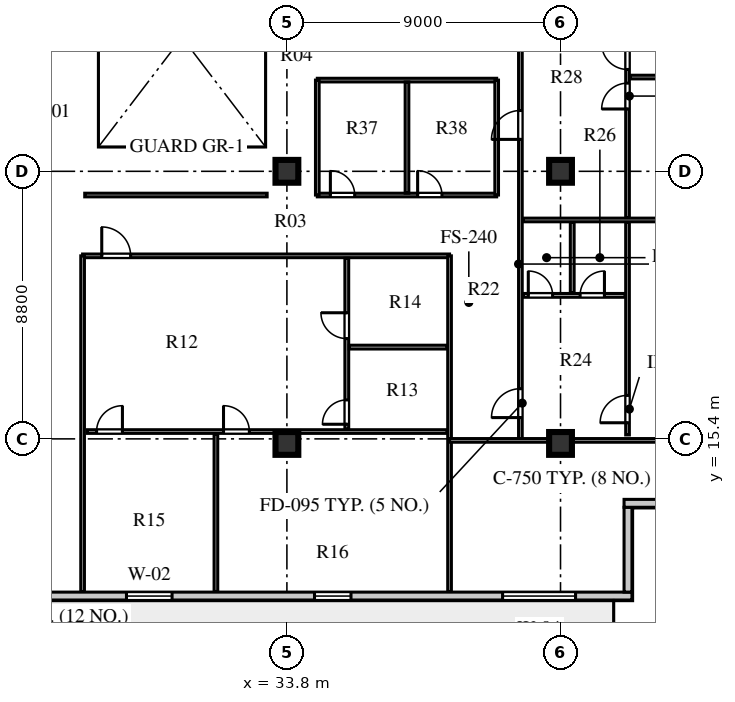
"""IFC4 building model, lengths in metres.
Left out: names, types, materials, properties, quantities, classifications, styles, units other than length and angle.
Written with IfcOpenShell. Run it as: python <this file> out.ifc"""

import sys

from ifc_helpers import new_model, si_unit, direction, frame, frame_2d, origin, origin_2d, place, context, subcontext, project, spatial, rectangle, extrude, element, fill, save


model = new_model("IFC4")
c1 = context("Model", 3, precision=1e-05, world=origin(), true_north=direction((0.0, 1.0)))
c2 = subcontext(c1, "Body", "Model", "MODEL_VIEW")
j1 = project(units=[si_unit("LENGTHUNIT", "METRE"), si_unit("PLANEANGLEUNIT", "RADIAN")], contexts=[c1])
p1 = place(None, origin())
s1 = spatial("IfcSite", under=j1, at=p1, CompositionType="ELEMENT")
p2 = place(p1, origin())
s2 = spatial("IfcBuilding", under=s1, at=p2, CompositionType="ELEMENT")
p3 = place(p2, frame((0.0, 0.0, 288.2)))
s3 = spatial("IfcBuildingStorey", under=s2, at=p3, CompositionType="ELEMENT", Elevation=288.2)
for number, where, z_axis, x_axis in (
    (1, (33.8, 15.25, 0.0), (0.0, 0.0, 1.0), (1.0, 0.0, 0.0)),
    (2, (33.8, 24.2, 0.0), (0.0, 0.0, 1.0), (1.0, 0.0, 0.0)),
    (3, (42.8, 15.25, 0.0), (0.0, 0.0, 1.0), (1.0, 0.0, 0.0)),
    (4, (42.8, 24.2, 0.0), (0.0, 0.0, 1.0), (1.0, 0.0, 0.0)),
):
    element("IfcColumn", number, at=place(p3, frame(where, z_axis=z_axis, x_axis=x_axis)), inside=s3, PredefinedType="COLUMN", context=c2, shape_type="SweptSolid", body=[
        extrude(rectangle(XDim=0.75, YDim=0.75, at=origin_2d()), origin(), (0.0, 0.0, 1.0), 3.66),
    ])
p4 = place(p3, frame((13.45, 10.23, 0.0), z_axis=(0.0, 0.0, 1.0), x_axis=(1.0, 0.0, 0.0)))
e5 = element("IfcWall", 5, at=p4, inside=s3, PredefinedType="SOLIDWALL", context=c2, shape_type="SweptSolid", body=[
    extrude(rectangle(XDim=31.7, YDim=0.26, at=frame_2d((15.85, 0.0))), origin(), (0.0, 0.0, 1.0), 3.66),
])
p5 = place(p4, frame((0.95, 0.0, 0.0)))
e6 = element("IfcOpeningElement", 6, at=p5, cuts=e5, PredefinedType="OPENING", context=c2, shape_type="SweptSolid", body=[
    extrude(rectangle(XDim=1.0, YDim=2.05, at=frame_2d((0.5, 1.025))), frame((0.0, 0.14, 0.0), z_axis=(0.0, -1.0, 0.0), x_axis=(1.0, 0.0, 0.0)), (0.0, 0.0, 1.0), 0.28),
])
p6 = place(p4, frame((2.835, 0.0, 0.8)))
e7 = element("IfcOpeningElement", 7, at=p6, cuts=e5, PredefinedType="OPENING", context=c2, shape_type="SweptSolid", body=[
    extrude(rectangle(XDim=2.25, YDim=2.0, at=frame_2d((1.125, 1.0))), frame((0.0, 0.14, 0.0), z_axis=(0.0, -1.0, 0.0), x_axis=(1.0, 0.0, 0.0)), (0.0, 0.0, 1.0), 0.28),
])
p7 = place(p4, frame((7.995, 0.0, 0.8)))
e8 = element("IfcOpeningElement", 8, at=p7, cuts=e5, PredefinedType="OPENING", context=c2, shape_type="SweptSolid", body=[
    extrude(rectangle(XDim=1.8, YDim=2.0, at=frame_2d((0.9, 1.0))), frame((0.0, 0.14, 0.0), z_axis=(0.0, -1.0, 0.0), x_axis=(1.0, 0.0, 0.0)), (0.0, 0.0, 1.0), 0.28),
])
p8 = place(p4, frame((15.073, 0.0, 0.8)))
e9 = element("IfcOpeningElement", 9, at=p8, cuts=e5, PredefinedType="OPENING", context=c2, shape_type="SweptSolid", body=[
    extrude(rectangle(XDim=1.5, YDim=2.0, at=frame_2d((0.75, 1.0))), frame((0.0, 0.14, 0.0), z_axis=(0.0, -1.0, 0.0), x_axis=(1.0, 0.0, 0.0)), (0.0, 0.0, 1.0), 0.28),
])
p9 = place(p4, frame((21.258, 0.0, 0.8)))
e10 = element("IfcOpeningElement", 10, at=p9, cuts=e5, PredefinedType="OPENING", context=c2, shape_type="SweptSolid", body=[
    extrude(rectangle(XDim=1.2, YDim=1.75, at=frame_2d((0.6, 0.875))), frame((0.0, 0.14, 0.0), z_axis=(0.0, -1.0, 0.0), x_axis=(1.0, 0.0, 0.0)), (0.0, 0.0, 1.0), 0.28),
])
p10 = place(p4, frame((27.445, 0.0, 0.8)))
e11 = element("IfcOpeningElement", 11, at=p10, cuts=e5, PredefinedType="OPENING", context=c2, shape_type="SweptSolid", body=[
    extrude(rectangle(XDim=2.4, YDim=2.05, at=frame_2d((1.2, 1.025))), frame((0.0, 0.14, 0.0), z_axis=(0.0, -1.0, 0.0), x_axis=(1.0, 0.0, 0.0)), (0.0, 0.0, 1.0), 0.28),
])
p11 = place(p3, frame((45.02, 10.36, 0.0), z_axis=(0.0, 0.0, 1.0), x_axis=(0.0, 1.0, 0.0)))
e12 = element("IfcWall", 12, at=p11, inside=s3, PredefinedType="SOLIDWALL", context=c2, shape_type="SweptSolid", body=[
    extrude(rectangle(XDim=2.79, YDim=0.26, at=frame_2d((1.395, 0.0))), origin(), (0.0, 0.0, 1.0), 3.66),
])
p12 = place(p3, frame((44.89, 13.28, 0.0), z_axis=(0.0, 0.0, 1.0), x_axis=(1.0, 0.0, 0.0)))
e13 = element("IfcWall", 13, at=p12, inside=s3, PredefinedType="SOLIDWALL", context=c2, shape_type="SweptSolid", body=[
    extrude(rectangle(XDim=3.31, YDim=0.26, at=frame_2d((1.655, 0.0))), origin(), (0.0, 0.0, 1.0), 3.66),
])
p13 = place(p3, frame((27.08, 21.42, 0.0), z_axis=(0.0, 0.0, 1.0), x_axis=(1.0, 0.0, 0.0)))
e14 = element("IfcWall", 14, at=p13, inside=s3, PredefinedType="PARTITIONING", context=c2, shape_type="SweptSolid", body=[
    extrude(rectangle(XDim=12.07, YDim=0.12, at=frame_2d((6.035, 0.0))), origin(), (0.0, 0.0, 1.0), 3.36),
])
p14 = place(p13, frame((0.63, 0.0, 0.0)))
e15 = element("IfcOpeningElement", 15, at=p14, cuts=e14, PredefinedType="OPENING", context=c2, shape_type="SweptSolid", body=[
    extrude(rectangle(XDim=0.95, YDim=2.1, at=frame_2d((0.475, 1.05))), frame((0.0, 0.07, 0.0), z_axis=(0.0, -1.0, 0.0), x_axis=(1.0, 0.0, 0.0)), (0.0, 0.0, 1.0), 0.14),
])
p15 = place(p3, frame((27.08, 10.38, 0.0), z_axis=(0.0, 0.0, 1.0), x_axis=(0.0, 1.0, 0.0)))
e16 = element("IfcWall", 16, at=p15, inside=s3, PredefinedType="PARTITIONING", context=c2, shape_type="SweptSolid", body=[
    extrude(rectangle(XDim=11.04, YDim=0.12, at=frame_2d((5.52, 0.0))), origin(), (0.0, 0.0, 1.0), 3.66),
])
p16 = place(p3, frame((27.15, 23.42, 0.0), z_axis=(0.0, 0.0, 1.0), x_axis=(1.0, 0.0, 0.0)))
e17 = element("IfcWall", 17, at=p16, inside=s3, PredefinedType="PARTITIONING", context=c2, shape_type="SweptSolid", body=[
    extrude(rectangle(XDim=6.0, YDim=0.12, at=frame_2d((3.0, 0.0))), origin(), (0.0, 0.0, 1.0), 3.66),
])
p17 = place(p3, frame((39.15, 10.38, 0.0), z_axis=(0.0, 0.0, 1.0), x_axis=(0.0, 1.0, 0.0)))
e18 = element("IfcWall", 18, at=p17, inside=s3, PredefinedType="PARTITIONING", context=c2, shape_type="SweptSolid", body=[
    extrude(rectangle(XDim=11.04, YDim=0.12, at=frame_2d((5.52, 0.0))), origin(), (0.0, 0.0, 1.0), 3.66),
])
p18 = place(p3, frame((27.24, 15.641, 0.0), z_axis=(0.0, 0.0, 1.0), x_axis=(1.0, 0.0, 0.0)))
e19 = element("IfcWall", 19, at=p18, inside=s3, PredefinedType="PARTITIONING", context=c2, shape_type="SweptSolid", body=[
    extrude(rectangle(XDim=11.83, YDim=0.12, at=frame_2d((5.915, 0.0))), origin(), (0.0, 0.0, 1.0), 3.66),
])
p19 = place(p18, frame((0.3, 0.0, 0.0)))
e20 = element("IfcOpeningElement", 20, at=p19, cuts=e19, PredefinedType="OPENING", context=c2, shape_type="SweptSolid", body=[
    extrude(rectangle(XDim=0.85, YDim=2.08, at=frame_2d((0.425, 1.04))), frame((0.0, 0.07, 0.0), z_axis=(0.0, -1.0, 0.0), x_axis=(1.0, 0.0, 0.0)), (0.0, 0.0, 1.0), 0.14),
])
p20 = place(p18, frame((4.475, 0.0, 0.0)))
e21 = element("IfcOpeningElement", 21, at=p20, cuts=e19, PredefinedType="OPENING", context=c2, shape_type="SweptSolid", body=[
    extrude(rectangle(XDim=0.85, YDim=2.08, at=frame_2d((0.425, 1.04))), frame((0.0, 0.07, 0.0), z_axis=(0.0, -1.0, 0.0), x_axis=(1.0, 0.0, 0.0)), (0.0, 0.0, 1.0), 0.14),
])
p21 = place(p3, frame((35.77, 15.721, 0.0), z_axis=(0.0, 0.0, 1.0), x_axis=(0.0, 1.0, 0.0)))
e22 = element("IfcWall", 22, at=p21, inside=s3, PredefinedType="PLUMBINGWALL", context=c2, shape_type="SweptSolid", body=[
    extrude(rectangle(XDim=5.619, YDim=0.125, at=frame_2d((2.81, 0.0))), origin(), (0.0, 0.0, 1.0), 3.66),
])
p22 = place(p21, frame((0.16, 0.0, 0.0)))
e23 = element("IfcOpeningElement", 23, at=p22, cuts=e22, PredefinedType="OPENING", context=c2, shape_type="SweptSolid", body=[
    extrude(rectangle(XDim=0.8, YDim=2.05, at=frame_2d((0.4, 1.025))), frame((0.0, 0.073, 0.0), z_axis=(0.0, -1.0, 0.0), x_axis=(1.0, 0.0, 0.0)), (0.0, 0.0, 1.0), 0.145),
])
p23 = place(p21, frame((2.977, 0.0, 0.0)))
e24 = element("IfcOpeningElement", 24, at=p23, cuts=e22, PredefinedType="OPENING", context=c2, shape_type="SweptSolid", body=[
    extrude(rectangle(XDim=0.85, YDim=2.08, at=frame_2d((0.425, 1.04))), frame((0.0, 0.073, 0.0), z_axis=(0.0, -1.0, 0.0), x_axis=(1.0, 0.0, 0.0)), (0.0, 0.0, 1.0), 0.145),
])
p24 = place(p3, frame((35.85, 18.418, 0.0), z_axis=(0.0, 0.0, 1.0), x_axis=(1.0, 0.0, 0.0)))
e25 = element("IfcWall", 25, at=p24, inside=s3, PredefinedType="PLUMBINGWALL", context=c2, shape_type="SweptSolid", body=[
    extrude(rectangle(XDim=3.22, YDim=0.125, at=frame_2d((1.61, 0.0))), origin(), (0.0, 0.0, 1.0), 3.36),
])
p25 = place(p3, frame((31.465, 10.38, 0.0), z_axis=(0.0, 0.0, 1.0), x_axis=(0.0, 1.0, 0.0)))
e26 = element("IfcWall", 26, at=p25, inside=s3, PredefinedType="PARTITIONING", context=c2, shape_type="SweptSolid", body=[
    extrude(rectangle(XDim=5.181, YDim=0.12, at=frame_2d((2.591, 0.0))), origin(), (0.0, 0.0, 1.0), 3.66),
])
p26 = place(p3, frame((41.48, 15.35, 0.0), z_axis=(0.0, 0.0, 1.0), x_axis=(0.0, 1.0, 0.0)))
e27 = element("IfcWall", 27, at=p26, inside=s3, PredefinedType="PARTITIONING", context=c2, shape_type="SweptSolid", body=[
    extrude(rectangle(XDim=26.5, YDim=0.12, at=frame_2d((13.25, 0.0))), origin(), (0.0, 0.0, 1.0), 3.66),
])
p27 = place(p26, frame((0.75, 0.0, 0.0)))
e28 = element("IfcOpeningElement", 28, at=p27, cuts=e27, PredefinedType="OPENING", context=c2, shape_type="SweptSolid", body=[
    extrude(rectangle(XDim=0.95, YDim=2.1, at=frame_2d((0.475, 1.05))), frame((0.0, 0.07, 0.0), z_axis=(0.0, -1.0, 0.0), x_axis=(1.0, 0.0, 0.0)), (0.0, 0.0, 1.0), 0.14),
])
p28 = place(p26, frame((9.9, 0.0, 0.0)))
e29 = element("IfcOpeningElement", 29, at=p28, cuts=e27, PredefinedType="OPENING", context=c2, shape_type="SweptSolid", body=[
    extrude(rectangle(XDim=0.95, YDim=2.1, at=frame_2d((0.475, 1.05))), frame((0.0, 0.07, 0.0), z_axis=(0.0, -1.0, 0.0), x_axis=(1.0, 0.0, 0.0)), (0.0, 0.0, 1.0), 0.14),
])
p29 = place(p26, frame((18.35, 0.0, 0.0)))
e30 = element("IfcOpeningElement", 30, at=p29, cuts=e27, PredefinedType="OPENING", context=c2, shape_type="SweptSolid", body=[
    extrude(rectangle(XDim=0.95, YDim=2.1, at=frame_2d((0.475, 1.05))), frame((0.0, 0.07, 0.0), z_axis=(0.0, -1.0, 0.0), x_axis=(1.0, 0.0, 0.0)), (0.0, 0.0, 1.0), 0.14),
])
p30 = place(p3, frame((39.15, 15.35, 0.0), z_axis=(0.0, 0.0, 1.0), x_axis=(1.0, 0.0, 0.0)))
e31 = element("IfcWall", 31, at=p30, inside=s3, PredefinedType="PARTITIONING", context=c2, shape_type="SweptSolid", body=[
    extrude(rectangle(XDim=8.77, YDim=0.12, at=frame_2d((4.385, 0.0))), origin(), (0.0, 0.0, 1.0), 3.06),
])
p31 = place(p3, frame((45.004, 15.53, 0.0), z_axis=(0.0, 0.0, 1.0), x_axis=(0.0, 1.0, 0.0)))
e32 = element("IfcWall", 32, at=p31, inside=s3, PredefinedType="PARTITIONING", context=c2, shape_type="SweptSolid", body=[
    extrude(rectangle(XDim=6.99, YDim=0.12, at=frame_2d((3.495, 0.0))), origin(), (0.0, 0.0, 1.0), 3.66),
])
p32 = place(p31, frame((0.4, 0.0, 0.0)))
e33 = element("IfcOpeningElement", 33, at=p32, cuts=e32, PredefinedType="OPENING", context=c2, shape_type="SweptSolid", body=[
    extrude(rectangle(XDim=0.9, YDim=2.08, at=frame_2d((0.45, 1.04))), frame((0.0, 0.07, 0.0), z_axis=(0.0, -1.0, 0.0), x_axis=(1.0, 0.0, 0.0)), (0.0, 0.0, 1.0), 0.14),
])
p33 = place(p3, frame((41.58, 20.12, 0.0), z_axis=(0.0, 0.0, 1.0), x_axis=(1.0, 0.0, 0.0)))
e34 = element("IfcWall", 34, at=p33, inside=s3, PredefinedType="PLUMBINGWALL", context=c2, shape_type="SweptSolid", body=[
    extrude(rectangle(XDim=3.344, YDim=0.125, at=frame_2d((1.672, 0.0))), origin(), (0.0, 0.0, 1.0), 3.66),
])
p34 = place(p33, frame((0.16, 0.0, 0.0)))
e35 = element("IfcOpeningElement", 35, at=p34, cuts=e34, PredefinedType="OPENING", context=c2, shape_type="SweptSolid", body=[
    extrude(rectangle(XDim=0.8, YDim=2.05, at=frame_2d((0.4, 1.025))), frame((0.0, 0.073, 0.0), z_axis=(0.0, -1.0, 0.0), x_axis=(1.0, 0.0, 0.0)), (0.0, 0.0, 1.0), 0.145),
])
p35 = place(p33, frame((1.865, 0.0, 0.0)))
e36 = element("IfcOpeningElement", 36, at=p35, cuts=e34, PredefinedType="OPENING", context=c2, shape_type="SweptSolid", body=[
    extrude(rectangle(XDim=0.8, YDim=2.05, at=frame_2d((0.4, 1.025))), frame((0.0, 0.073, 0.0), z_axis=(0.0, -1.0, 0.0), x_axis=(1.0, 0.0, 0.0)), (0.0, 0.0, 1.0), 0.145),
])
p36 = place(p3, frame((43.185, 20.2, 0.0), z_axis=(0.0, 0.0, 1.0), x_axis=(0.0, 1.0, 0.0)))
e37 = element("IfcWall", 37, at=p36, inside=s3, PredefinedType="PLUMBINGWALL", context=c2, shape_type="SweptSolid", body=[
    extrude(rectangle(XDim=2.32, YDim=0.125, at=frame_2d((1.16, 0.0))), origin(), (0.0, 0.0, 1.0), 3.66),
])
p37 = place(p3, frame((41.56, 22.6, 0.0), z_axis=(0.0, 0.0, 1.0), x_axis=(1.0, 0.0, 0.0)))
e38 = element("IfcWall", 38, at=p37, inside=s3, PredefinedType="PARTITIONING", context=c2, shape_type="SweptSolid", body=[
    extrude(rectangle(XDim=6.36, YDim=0.12, at=frame_2d((3.18, 0.0))), origin(), (0.0, 0.0, 1.0), 3.66),
])
p38 = place(p3, frame((45.004, 22.68, 0.0), z_axis=(0.0, 0.0, 1.0), x_axis=(0.0, 1.0, 0.0)))
e39 = element("IfcWall", 39, at=p38, inside=s3, PredefinedType="PARTITIONING", context=c2, shape_type="SweptSolid", body=[
    extrude(rectangle(XDim=9.24, YDim=0.12, at=frame_2d((4.62, 0.0))), origin(), (0.0, 0.0, 1.0), 3.66),
])
p39 = place(p38, frame((3.57, 0.0, 0.0)))
e40 = element("IfcOpeningElement", 40, at=p39, cuts=e39, PredefinedType="OPENING", context=c2, shape_type="SweptSolid", body=[
    extrude(rectangle(XDim=0.85, YDim=2.08, at=frame_2d((0.425, 1.04))), frame((0.0, 0.07, 0.0), z_axis=(0.0, -1.0, 0.0), x_axis=(1.0, 0.0, 0.0)), (0.0, 0.0, 1.0), 0.14),
])
p40 = place(p38, frame((4.87, 0.0, 0.0)))
e41 = element("IfcOpeningElement", 41, at=p40, cuts=e39, PredefinedType="OPENING", context=c2, shape_type="SweptSolid", body=[
    extrude(rectangle(XDim=0.85, YDim=2.08, at=frame_2d((0.425, 1.04))), frame((0.0, 0.07, 0.0), z_axis=(0.0, -1.0, 0.0), x_axis=(1.0, 0.0, 0.0)), (0.0, 0.0, 1.0), 0.14),
])
p41 = place(p3, frame((45.084, 27.3, 0.0), z_axis=(0.0, 0.0, 1.0), x_axis=(1.0, 0.0, 0.0)))
e42 = element("IfcWall", 42, at=p41, inside=s3, PredefinedType="PARTITIONING", context=c2, shape_type="SweptSolid", body=[
    extrude(rectangle(XDim=2.836, YDim=0.12, at=frame_2d((1.418, 0.0))), origin(), (0.0, 0.0, 1.0), 3.66),
])
p42 = place(p3, frame((34.8, 23.42, 0.0), z_axis=(0.0, 0.0, 1.0), x_axis=(1.0, 0.0, 0.0)))
e43 = element("IfcWall", 43, at=p42, inside=s3, PredefinedType="PARTITIONING", context=c2, shape_type="SweptSolid", body=[
    extrude(rectangle(XDim=5.9, YDim=0.12, at=frame_2d((2.95, 0.0))), origin(), (0.0, 0.0, 1.0), 3.66),
])
p43 = place(p42, frame((0.43, 0.0, 0.0)))
e44 = element("IfcOpeningElement", 44, at=p43, cuts=e43, PredefinedType="OPENING", context=c2, shape_type="SweptSolid", body=[
    extrude(rectangle(XDim=0.8, YDim=2.05, at=frame_2d((0.4, 1.025))), frame((0.0, 0.07, 0.0), z_axis=(0.0, -1.0, 0.0), x_axis=(1.0, 0.0, 0.0)), (0.0, 0.0, 1.0), 0.14),
])
p44 = place(p42, frame((3.3, 0.0, 0.0)))
e45 = element("IfcOpeningElement", 45, at=p44, cuts=e43, PredefinedType="OPENING", context=c2, shape_type="SweptSolid", body=[
    extrude(rectangle(XDim=0.8, YDim=2.05, at=frame_2d((0.4, 1.025))), frame((0.0, 0.07, 0.0), z_axis=(0.0, -1.0, 0.0), x_axis=(1.0, 0.0, 0.0)), (0.0, 0.0, 1.0), 0.14),
])
p45 = place(p3, frame((34.8, 27.2, 0.0), z_axis=(0.0, 0.0, 1.0), x_axis=(1.0, 0.0, 0.0)))
e46 = element("IfcWall", 46, at=p45, inside=s3, PredefinedType="PARTITIONING", context=c2, shape_type="SweptSolid", body=[
    extrude(rectangle(XDim=5.9, YDim=0.12, at=frame_2d((2.95, 0.0))), origin(), (0.0, 0.0, 1.0), 3.36),
])
for number, where, z_axis, x_axis in (
    (47, (34.8, 23.42, 0.0), (0.0, 0.0, 1.0), (0.0, 1.0, 0.0)),
    (48, (40.7, 23.42, 0.0), (0.0, 0.0, 1.0), (0.0, 1.0, 0.0)),
):
    element("IfcWall", number, at=place(p3, frame(where, z_axis=z_axis, x_axis=x_axis)), inside=s3, PredefinedType="PARTITIONING", context=c2, shape_type="SweptSolid", body=[
        extrude(rectangle(XDim=3.78, YDim=0.12, at=frame_2d((1.89, 0.0))), origin(), (0.0, 0.0, 1.0), 3.66),
    ])
p46 = place(p3, frame((37.75, 23.48, 0.0), z_axis=(0.0, 0.0, 1.0), x_axis=(0.0, 1.0, 0.0)))
e49 = element("IfcWall", 49, at=p46, inside=s3, PredefinedType="PARTITIONING", context=c2, shape_type="SweptSolid", body=[
    extrude(rectangle(XDim=3.66, YDim=0.12, at=frame_2d((1.83, 0.0))), origin(), (0.0, 0.0, 1.0), 3.66),
])
p47 = place(p8, origin())
e50 = element("IfcWindow", 50, at=p47, inside=s3, PartitioningType="SINGLE_PANEL", PredefinedType="WINDOW", context=c2, shape_type="SweptSolid", body=[
    extrude(rectangle(XDim=1.5, YDim=2.0, at=frame_2d((0.75, 1.0))), frame((0.0, 0.03, 0.0), z_axis=(0.0, -1.0, 0.0), x_axis=(1.0, 0.0, 0.0)), (0.0, 0.0, 1.0), 0.06),
])
fill(e9, e50)
p48 = place(p9, origin())
e51 = element("IfcWindow", 51, at=p48, inside=s3, PartitioningType="SINGLE_PANEL", PredefinedType="WINDOW", context=c2, shape_type="SweptSolid", body=[
    extrude(rectangle(XDim=1.2, YDim=1.75, at=frame_2d((0.6, 0.875))), frame((0.0, 0.03, 0.0), z_axis=(0.0, -1.0, 0.0), x_axis=(1.0, 0.0, 0.0)), (0.0, 0.0, 1.0), 0.06),
])
fill(e10, e51)
p49 = place(p10, origin())
e52 = element("IfcWindow", 52, at=p49, inside=s3, PartitioningType="SINGLE_PANEL", PredefinedType="WINDOW", context=c2, shape_type="SweptSolid", body=[
    extrude(rectangle(XDim=2.4, YDim=2.05, at=frame_2d((1.2, 1.025))), frame((0.0, 0.03, 0.0), z_axis=(0.0, -1.0, 0.0), x_axis=(1.0, 0.0, 0.0)), (0.0, 0.0, 1.0), 0.06),
])
fill(e11, e52)
p50 = place(p22, origin())
e53 = element("IfcDoor", 53, at=p50, inside=s3, OperationType="SINGLE_SWING_LEFT", PredefinedType="DOOR", context=c2, shape_type="SweptSolid", body=[
    extrude(rectangle(XDim=0.8, YDim=2.05, at=frame_2d((0.4, 1.025))), frame((0.0, 0.025, 0.0), z_axis=(0.0, -1.0, 0.0), x_axis=(1.0, 0.0, 0.0)), (0.0, 0.0, 1.0), 0.05),
])
fill(e23, e53)
p51 = place(p23, origin())
e54 = element("IfcDoor", 54, at=p51, inside=s3, OperationType="SINGLE_SWING_RIGHT", PredefinedType="DOOR", context=c2, shape_type="SweptSolid", body=[
    extrude(rectangle(XDim=0.85, YDim=2.08, at=frame_2d((0.425, 1.04))), frame((0.0, 0.025, 0.0), z_axis=(0.0, -1.0, 0.0), x_axis=(1.0, 0.0, 0.0)), (0.0, 0.0, 1.0), 0.05),
])
fill(e24, e54)
p52 = place(p19, frame((0.85, 0.0, 0.0), z_axis=(0.0, 0.0, 1.0), x_axis=(-1.0, 0.0, 0.0)))
e55 = element("IfcDoor", 55, at=p52, inside=s3, OperationType="SINGLE_SWING_LEFT", PredefinedType="DOOR", context=c2, shape_type="SweptSolid", body=[
    extrude(rectangle(XDim=0.85, YDim=2.08, at=frame_2d((0.425, 1.04))), frame((0.0, 0.025, 0.0), z_axis=(0.0, -1.0, 0.0), x_axis=(1.0, 0.0, 0.0)), (0.0, 0.0, 1.0), 0.05),
])
fill(e20, e55)
p53 = place(p20, frame((0.85, 0.0, 0.0), z_axis=(0.0, 0.0, 1.0), x_axis=(-1.0, 0.0, 0.0)))
e56 = element("IfcDoor", 56, at=p53, inside=s3, OperationType="SINGLE_SWING_RIGHT", PredefinedType="DOOR", context=c2, shape_type="SweptSolid", body=[
    extrude(rectangle(XDim=0.85, YDim=2.08, at=frame_2d((0.425, 1.04))), frame((0.0, 0.025, 0.0), z_axis=(0.0, -1.0, 0.0), x_axis=(1.0, 0.0, 0.0)), (0.0, 0.0, 1.0), 0.05),
])
fill(e21, e56)
p54 = place(p14, frame((0.95, 0.0, 0.0), z_axis=(0.0, 0.0, 1.0), x_axis=(-1.0, 0.0, 0.0)))
e57 = element("IfcDoor", 57, at=p54, inside=s3, OperationType="SINGLE_SWING_RIGHT", PredefinedType="DOOR", context=c2, shape_type="SweptSolid", body=[
    extrude(rectangle(XDim=0.95, YDim=2.1, at=frame_2d((0.475, 1.05))), frame((0.0, 0.025, 0.0), z_axis=(0.0, -1.0, 0.0), x_axis=(1.0, 0.0, 0.0)), (0.0, 0.0, 1.0), 0.05),
])
fill(e15, e57)
p55 = place(p34, origin())
e58 = element("IfcDoor", 58, at=p55, inside=s3, OperationType="SINGLE_SWING_LEFT", PredefinedType="DOOR", context=c2, shape_type="SweptSolid", body=[
    extrude(rectangle(XDim=0.8, YDim=2.05, at=frame_2d((0.4, 1.025))), frame((0.0, 0.025, 0.0), z_axis=(0.0, -1.0, 0.0), x_axis=(1.0, 0.0, 0.0)), (0.0, 0.0, 1.0), 0.05),
])
fill(e35, e58)
p56 = place(p35, origin())
e59 = element("IfcDoor", 59, at=p56, inside=s3, OperationType="SINGLE_SWING_RIGHT", PredefinedType="DOOR", context=c2, shape_type="SweptSolid", body=[
    extrude(rectangle(XDim=0.8, YDim=2.05, at=frame_2d((0.4, 1.025))), frame((0.0, 0.025, 0.0), z_axis=(0.0, -1.0, 0.0), x_axis=(1.0, 0.0, 0.0)), (0.0, 0.0, 1.0), 0.05),
])
fill(e36, e59)
p57 = place(p32, origin())
e60 = element("IfcDoor", 60, at=p57, inside=s3, OperationType="SINGLE_SWING_LEFT", PredefinedType="DOOR", context=c2, shape_type="SweptSolid", body=[
    extrude(rectangle(XDim=0.9, YDim=2.08, at=frame_2d((0.45, 1.04))), frame((0.0, 0.025, 0.0), z_axis=(0.0, -1.0, 0.0), x_axis=(1.0, 0.0, 0.0)), (0.0, 0.0, 1.0), 0.05),
])
fill(e33, e60)
p58 = place(p27, origin())
e61 = element("IfcDoor", 61, at=p58, inside=s3, OperationType="SINGLE_SWING_LEFT", PredefinedType="DOOR", context=c2, shape_type="SweptSolid", body=[
    extrude(rectangle(XDim=0.95, YDim=2.1, at=frame_2d((0.475, 1.05))), frame((0.0, 0.025, 0.0), z_axis=(0.0, -1.0, 0.0), x_axis=(1.0, 0.0, 0.0)), (0.0, 0.0, 1.0), 0.05),
])
fill(e28, e61)
p59 = place(p39, origin())
e62 = element("IfcDoor", 62, at=p59, inside=s3, OperationType="SINGLE_SWING_LEFT", PredefinedType="DOOR", context=c2, shape_type="SweptSolid", body=[
    extrude(rectangle(XDim=0.85, YDim=2.08, at=frame_2d((0.425, 1.04))), frame((0.0, 0.025, 0.0), z_axis=(0.0, -1.0, 0.0), x_axis=(1.0, 0.0, 0.0)), (0.0, 0.0, 1.0), 0.05),
])
fill(e40, e62)
p60 = place(p40, origin())
e63 = element("IfcDoor", 63, at=p60, inside=s3, OperationType="SINGLE_SWING_RIGHT", PredefinedType="DOOR", context=c2, shape_type="SweptSolid", body=[
    extrude(rectangle(XDim=0.85, YDim=2.08, at=frame_2d((0.425, 1.04))), frame((0.0, 0.025, 0.0), z_axis=(0.0, -1.0, 0.0), x_axis=(1.0, 0.0, 0.0)), (0.0, 0.0, 1.0), 0.05),
])
fill(e41, e63)
p61 = place(p28, origin())
e64 = element("IfcDoor", 64, at=p61, inside=s3, OperationType="SINGLE_SWING_LEFT", PredefinedType="DOOR", context=c2, shape_type="SweptSolid", body=[
    extrude(rectangle(XDim=0.95, YDim=2.1, at=frame_2d((0.475, 1.05))), frame((0.0, 0.025, 0.0), z_axis=(0.0, -1.0, 0.0), x_axis=(1.0, 0.0, 0.0)), (0.0, 0.0, 1.0), 0.05),
])
fill(e29, e64)
p62 = place(p43, origin())
e65 = element("IfcDoor", 65, at=p62, inside=s3, OperationType="SINGLE_SWING_LEFT", PredefinedType="DOOR", context=c2, shape_type="SweptSolid", body=[
    extrude(rectangle(XDim=0.8, YDim=2.05, at=frame_2d((0.4, 1.025))), frame((0.0, 0.025, 0.0), z_axis=(0.0, -1.0, 0.0), x_axis=(1.0, 0.0, 0.0)), (0.0, 0.0, 1.0), 0.05),
])
fill(e44, e65)
p63 = place(p44, origin())
e66 = element("IfcDoor", 66, at=p63, inside=s3, OperationType="SINGLE_SWING_LEFT", PredefinedType="DOOR", context=c2, shape_type="SweptSolid", body=[
    extrude(rectangle(XDim=0.8, YDim=2.05, at=frame_2d((0.4, 1.025))), frame((0.0, 0.025, 0.0), z_axis=(0.0, -1.0, 0.0), x_axis=(1.0, 0.0, 0.0)), (0.0, 0.0, 1.0), 0.05),
])
fill(e45, e66)
save(model, sys.argv[1])
